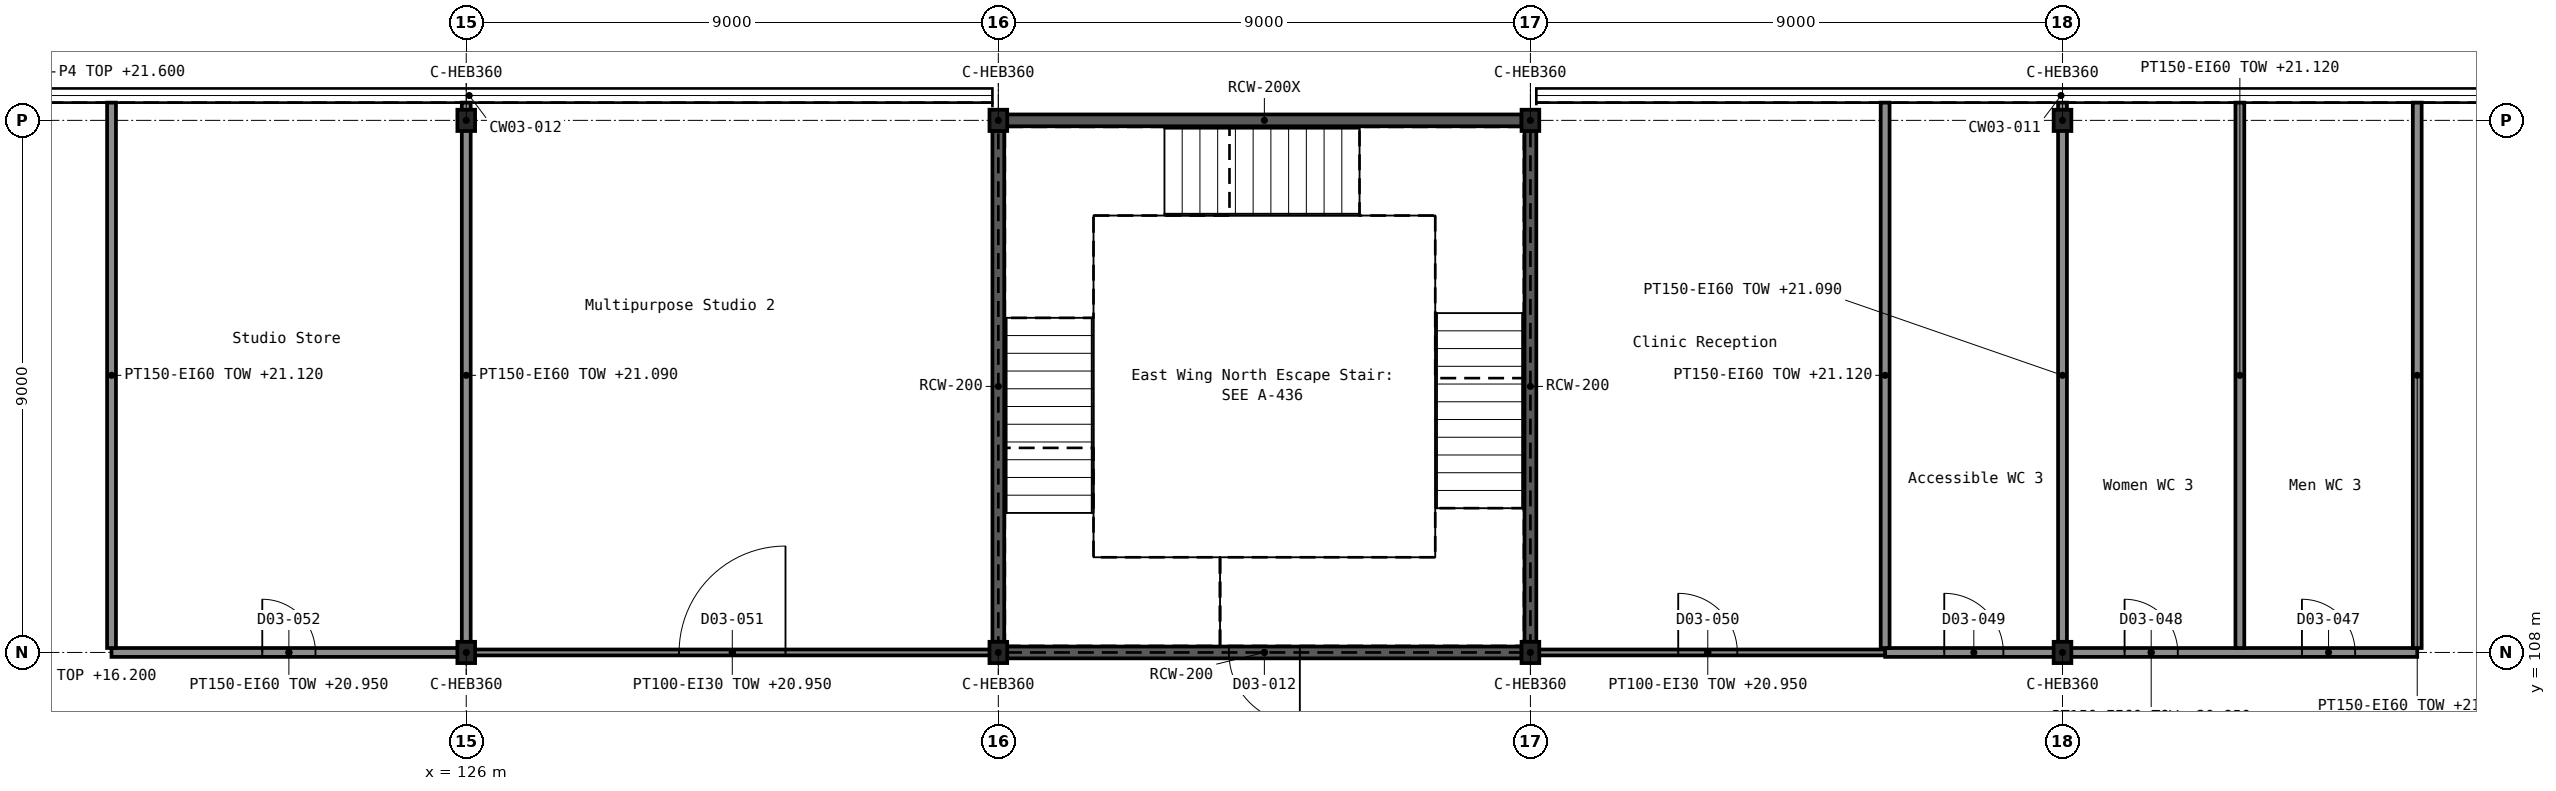
"""IFC4 building model, lengths in metres.
Left out: names, types, materials, properties, quantities, classifications, styles, units other than length and angle.
Written with IfcOpenShell. Run it as: python <this file> out.ifc"""

import sys

from ifc_helpers import new_model, si_unit, direction, frame, frame_2d, origin, origin_2d, place, context, subcontext, project, spatial, rectangle, i_section, extrude, element, fill, save


model = new_model("IFC4")
c1 = context("Model", 3, precision=1e-05, world=origin(), true_north=direction((0.0, 1.0)))
c2 = subcontext(c1, "Body", "Model", "MODEL_VIEW")
j1 = project(units=[si_unit("LENGTHUNIT", "METRE"), si_unit("PLANEANGLEUNIT", "RADIAN")], contexts=[c1])
p1 = place(None, origin())
s1 = spatial("IfcSite", under=j1, at=p1, CompositionType="ELEMENT")
p2 = place(p1, origin())
s2 = spatial("IfcBuilding", under=s1, at=p2, CompositionType="ELEMENT")
p3 = place(p2, frame((0.0, 0.0, 16.2)))
s3 = spatial("IfcBuildingStorey", under=s2, at=p3, CompositionType="ELEMENT", Elevation=16.2)
for number, where, z_axis, x_axis in (
    (1, (126.0, 108.0, 0.0), (0.0, 0.0, 1.0), (1.0, 0.0, 0.0)),
    (2, (135.0, 108.0, 0.0), (0.0, 0.0, 1.0), (1.0, 0.0, 0.0)),
    (3, (144.0, 108.0, 0.0), (0.0, 0.0, 1.0), (1.0, 0.0, 0.0)),
    (4, (153.0, 108.0, 0.0), (0.0, 0.0, 1.0), (1.0, 0.0, 0.0)),
    (5, (126.0, 117.0, 0.0), (0.0, 0.0, 1.0), (1.0, 0.0, 0.0)),
    (6, (135.0, 117.0, 0.0), (0.0, 0.0, 1.0), (1.0, 0.0, 0.0)),
    (7, (144.0, 117.0, 0.0), (0.0, 0.0, 1.0), (1.0, 0.0, 0.0)),
    (8, (153.0, 117.0, 0.0), (0.0, 0.0, 1.0), (1.0, 0.0, 0.0)),
):
    element("IfcColumn", number, at=place(p3, frame(where, z_axis=z_axis, x_axis=x_axis)), inside=s3, PredefinedType="COLUMN", context=c2, shape_type="SweptSolid", body=[
        extrude(i_section(OverallWidth=0.3, OverallDepth=0.36, WebThickness=0.012, FlangeThickness=0.022, FilletRadius=0.027, at=origin_2d()), origin(), (0.0, 0.0, 1.0), 5.4),
    ])
p4 = place(p3, frame((135.15, 108.0, 0.0), z_axis=(0.0, 0.0, 1.0), x_axis=(1.0, 0.0, 0.0)))
e9 = element("IfcWall", 9, at=p4, inside=s3, PredefinedType="SHEAR", context=c2, shape_type="SweptSolid", body=[
    extrude(rectangle(XDim=8.7, YDim=0.2, at=frame_2d((4.35, 0.0))), origin(), (0.0, 0.0, 1.0), 5.4),
])
p5 = place(p4, frame((3.75, 0.0, 0.0)))
e10 = element("IfcOpeningElement", 10, at=p5, cuts=e9, PredefinedType="OPENING", context=c2, shape_type="SweptSolid", body=[
    extrude(rectangle(XDim=1.2, YDim=2.1, at=frame_2d((0.6, 1.05))), frame((0.0, 0.111, 0.0), z_axis=(0.0, -1.0, 0.0), x_axis=(1.0, 0.0, 0.0)), (0.0, 0.0, 1.0), 0.222),
])
p6 = place(p3, frame((135.15, 117.0, 0.0), z_axis=(0.0, 0.0, 1.0), x_axis=(1.0, 0.0, 0.0)))
e11 = element("IfcWall", 11, at=p6, inside=s3, PredefinedType="SHEAR", context=c2, shape_type="SweptSolid", body=[
    extrude(rectangle(XDim=8.7, YDim=0.2, at=frame_2d((4.35, 0.0))), origin(), (0.0, 0.0, 1.0), 5.4),
])
for number, where, z_axis, x_axis in (
    (12, (135.0, 108.18, 0.0), (0.0, 0.0, 1.0), (0.0, 1.0, 0.0)),
    (13, (144.0, 108.18, 0.0), (0.0, 0.0, 1.0), (0.0, 1.0, 0.0)),
):
    element("IfcWall", number, at=place(p3, frame(where, z_axis=z_axis, x_axis=x_axis)), inside=s3, PredefinedType="SHEAR", context=c2, shape_type="SweptSolid", body=[
        extrude(rectangle(XDim=8.64, YDim=0.2, at=frame_2d((4.32, 0.0))), origin(), (0.0, 0.0, 1.0), 5.4),
    ])
p7 = place(p3, frame((120.0, 108.0, 0.0), z_axis=(0.0, 0.0, 1.0), x_axis=(1.0, 0.0, 0.0)))
e14 = element("IfcWall", 14, at=p7, inside=s3, PredefinedType="PARTITIONING", context=c2, shape_type="SweptSolid", body=[
    extrude(rectangle(XDim=6.0, YDim=0.15, at=frame_2d((3.0, 0.0))), origin(), (0.0, 0.0, 1.0), 4.75),
])
p8 = place(p7, frame((2.55, 0.0, 0.0)))
e15 = element("IfcOpeningElement", 15, at=p8, cuts=e14, PredefinedType="OPENING", context=c2, shape_type="SweptSolid", body=[
    extrude(rectangle(XDim=0.9, YDim=2.4, at=frame_2d((0.45, 1.2))), frame((0.0, 0.086, 0.0), z_axis=(0.0, -1.0, 0.0), x_axis=(1.0, 0.0, 0.0)), (0.0, 0.0, 1.0), 0.172),
])
p9 = place(p3, frame((150.0, 108.0, 0.0), z_axis=(0.0, 0.0, 1.0), x_axis=(1.0, 0.0, 0.0)))
e16 = element("IfcWall", 16, at=p9, inside=s3, PredefinedType="PARTITIONING", context=c2, shape_type="SweptSolid", body=[
    extrude(rectangle(XDim=9.0, YDim=0.15, at=frame_2d((4.5, 0.0))), origin(), (0.0, 0.0, 1.0), 4.75),
])
p10 = place(p9, frame((7.05, 0.0, 0.0)))
e17 = element("IfcOpeningElement", 17, at=p10, cuts=e16, PredefinedType="OPENING", context=c2, shape_type="SweptSolid", body=[
    extrude(rectangle(XDim=0.9, YDim=2.1, at=frame_2d((0.45, 1.05))), frame((0.0, 0.086, 0.0), z_axis=(0.0, -1.0, 0.0), x_axis=(1.0, 0.0, 0.0)), (0.0, 0.0, 1.0), 0.172),
])
p11 = place(p9, frame((4.05, 0.0, 0.0)))
e18 = element("IfcOpeningElement", 18, at=p11, cuts=e16, PredefinedType="OPENING", context=c2, shape_type="SweptSolid", body=[
    extrude(rectangle(XDim=0.9, YDim=2.1, at=frame_2d((0.45, 1.05))), frame((0.0, 0.086, 0.0), z_axis=(0.0, -1.0, 0.0), x_axis=(1.0, 0.0, 0.0)), (0.0, 0.0, 1.0), 0.172),
])
p12 = place(p9, frame((1.0, 0.0, 0.0)))
e19 = element("IfcOpeningElement", 19, at=p12, cuts=e16, PredefinedType="OPENING", context=c2, shape_type="SweptSolid", body=[
    extrude(rectangle(XDim=1.0, YDim=2.1, at=frame_2d((0.5, 1.05))), frame((0.0, 0.086, 0.0), z_axis=(0.0, -1.0, 0.0), x_axis=(1.0, 0.0, 0.0)), (0.0, 0.0, 1.0), 0.172),
])
p13 = place(p3, frame((120.0, 108.075, 0.0), z_axis=(0.0, 0.0, 1.0), x_axis=(0.0, 1.0, 0.0)))
e20 = element("IfcWall", 20, at=p13, inside=s3, PredefinedType="PARTITIONING", context=c2, shape_type="SweptSolid", body=[
    extrude(rectangle(XDim=9.225, YDim=0.15, at=frame_2d((4.613, 0.0))), origin(), (0.0, 0.0, 1.0), 4.92),
])
p14 = place(p3, frame((126.0, 108.075, 0.0), z_axis=(0.0, 0.0, 1.0), x_axis=(0.0, 1.0, 0.0)))
e21 = element("IfcWall", 21, at=p14, inside=s3, PredefinedType="PARTITIONING", context=c2, shape_type="SweptSolid", body=[
    extrude(rectangle(XDim=9.225, YDim=0.15, at=frame_2d((4.613, 0.0))), origin(), (0.0, 0.0, 1.0), 4.89),
])
p15 = place(p3, frame((150.0, 108.075, 0.0), z_axis=(0.0, 0.0, 1.0), x_axis=(0.0, 1.0, 0.0)))
e22 = element("IfcWall", 22, at=p15, inside=s3, PredefinedType="PARTITIONING", context=c2, shape_type="SweptSolid", body=[
    extrude(rectangle(XDim=9.225, YDim=0.15, at=frame_2d((4.613, 0.0))), origin(), (0.0, 0.0, 1.0), 4.92),
])
p16 = place(p3, frame((153.0, 108.075, 0.0), z_axis=(0.0, 0.0, 1.0), x_axis=(0.0, 1.0, 0.0)))
e23 = element("IfcWall", 23, at=p16, inside=s3, PredefinedType="PARTITIONING", context=c2, shape_type="SweptSolid", body=[
    extrude(rectangle(XDim=9.225, YDim=0.15, at=frame_2d((4.613, 0.0))), origin(), (0.0, 0.0, 1.0), 4.89),
])
for number, where, z_axis, x_axis in (
    (24, (156.0, 108.075, 0.0), (0.0, 0.0, 1.0), (0.0, 1.0, 0.0)),
    (25, (159.0, 108.075, 0.0), (0.0, 0.0, 1.0), (0.0, 1.0, 0.0)),
):
    element("IfcWall", number, at=place(p3, frame(where, z_axis=z_axis, x_axis=x_axis)), inside=s3, PredefinedType="PARTITIONING", context=c2, shape_type="SweptSolid", body=[
        extrude(rectangle(XDim=9.225, YDim=0.15, at=frame_2d((4.613, 0.0))), origin(), (0.0, 0.0, 1.0), 4.92),
    ])
p17 = place(p3, frame((126.0, 108.0, 0.0), z_axis=(0.0, 0.0, 1.0), x_axis=(1.0, 0.0, 0.0)))
e26 = element("IfcWall", 26, at=p17, inside=s3, PredefinedType="PARTITIONING", context=c2, shape_type="SweptSolid", body=[
    extrude(rectangle(XDim=9.0, YDim=0.1, at=frame_2d((4.5, 0.0))), origin(), (0.0, 0.0, 1.0), 4.75),
])
p18 = place(p17, frame((3.6, 0.0, 0.0)))
e27 = element("IfcOpeningElement", 27, at=p18, cuts=e26, PredefinedType="OPENING", context=c2, shape_type="SweptSolid", body=[
    extrude(rectangle(XDim=1.8, YDim=2.1, at=frame_2d((0.9, 1.05))), frame((0.0, 0.061, 0.0), z_axis=(0.0, -1.0, 0.0), x_axis=(1.0, 0.0, 0.0)), (0.0, 0.0, 1.0), 0.122),
])
p19 = place(p3, frame((144.0, 108.0, 0.0), z_axis=(0.0, 0.0, 1.0), x_axis=(1.0, 0.0, 0.0)))
e28 = element("IfcWall", 28, at=p19, inside=s3, PredefinedType="PARTITIONING", context=c2, shape_type="SweptSolid", body=[
    extrude(rectangle(XDim=6.0, YDim=0.1, at=frame_2d((3.0, 0.0))), origin(), (0.0, 0.0, 1.0), 4.75),
])
p20 = place(p19, frame((2.5, 0.0, 0.0)))
e29 = element("IfcOpeningElement", 29, at=p20, cuts=e28, PredefinedType="OPENING", context=c2, shape_type="SweptSolid", body=[
    extrude(rectangle(XDim=1.0, YDim=2.4, at=frame_2d((0.5, 1.2))), frame((0.0, 0.061, 0.0), z_axis=(0.0, -1.0, 0.0), x_axis=(1.0, 0.0, 0.0)), (0.0, 0.0, 1.0), 0.122),
])
p21 = place(p5, frame((1.2, 0.0, 0.0), z_axis=(0.0, 0.0, 1.0), x_axis=(-1.0, 0.0, 0.0)))
e30 = element("IfcDoor", 30, at=p21, inside=s3, OperationType="SINGLE_SWING_LEFT", PredefinedType="DOOR", context=c2, shape_type="SweptSolid", body=[
    extrude(rectangle(XDim=1.2, YDim=2.1, at=frame_2d((0.6, 1.05))), frame((0.0, 0.025, 0.0), z_axis=(0.0, -1.0, 0.0), x_axis=(1.0, 0.0, 0.0)), (0.0, 0.0, 1.0), 0.05),
])
fill(e10, e30)
p22 = place(p10, origin())
e31 = element("IfcDoor", 31, at=p22, inside=s3, OperationType="SINGLE_SWING_LEFT", PredefinedType="DOOR", context=c2, shape_type="SweptSolid", body=[
    extrude(rectangle(XDim=0.9, YDim=2.1, at=frame_2d((0.45, 1.05))), frame((0.0, 0.025, 0.0), z_axis=(0.0, -1.0, 0.0), x_axis=(1.0, 0.0, 0.0)), (0.0, 0.0, 1.0), 0.05),
])
fill(e17, e31)
p23 = place(p11, origin())
e32 = element("IfcDoor", 32, at=p23, inside=s3, OperationType="SINGLE_SWING_LEFT", PredefinedType="DOOR", context=c2, shape_type="SweptSolid", body=[
    extrude(rectangle(XDim=0.9, YDim=2.1, at=frame_2d((0.45, 1.05))), frame((0.0, 0.025, 0.0), z_axis=(0.0, -1.0, 0.0), x_axis=(1.0, 0.0, 0.0)), (0.0, 0.0, 1.0), 0.05),
])
fill(e18, e32)
p24 = place(p12, origin())
e33 = element("IfcDoor", 33, at=p24, inside=s3, OperationType="SINGLE_SWING_LEFT", PredefinedType="DOOR", context=c2, shape_type="SweptSolid", body=[
    extrude(rectangle(XDim=1.0, YDim=2.1, at=frame_2d((0.5, 1.05))), frame((0.0, 0.025, 0.0), z_axis=(0.0, -1.0, 0.0), x_axis=(1.0, 0.0, 0.0)), (0.0, 0.0, 1.0), 0.05),
])
fill(e19, e33)
p25 = place(p20, origin())
e34 = element("IfcDoor", 34, at=p25, inside=s3, OperationType="SINGLE_SWING_LEFT", PredefinedType="DOOR", context=c2, shape_type="SweptSolid", body=[
    extrude(rectangle(XDim=1.0, YDim=2.4, at=frame_2d((0.5, 1.2))), frame((0.0, 0.025, 0.0), z_axis=(0.0, -1.0, 0.0), x_axis=(1.0, 0.0, 0.0)), (0.0, 0.0, 1.0), 0.05),
])
fill(e29, e34)
p26 = place(p18, origin())
e35 = element("IfcDoor", 35, at=p26, inside=s3, OperationType="DOUBLE_DOOR_SINGLE_SWING", PredefinedType="DOOR", context=c2, shape_type="SweptSolid", body=[
    extrude(rectangle(XDim=1.8, YDim=2.1, at=frame_2d((0.9, 1.05))), frame((0.0, 0.025, 0.0), z_axis=(0.0, -1.0, 0.0), x_axis=(1.0, 0.0, 0.0)), (0.0, 0.0, 1.0), 0.05),
])
fill(e27, e35)
p27 = place(p8, origin())
e36 = element("IfcDoor", 36, at=p27, inside=s3, OperationType="SINGLE_SWING_LEFT", PredefinedType="DOOR", context=c2, shape_type="SweptSolid", body=[
    extrude(rectangle(XDim=0.9, YDim=2.4, at=frame_2d((0.45, 1.2))), frame((0.0, 0.025, 0.0), z_axis=(0.0, -1.0, 0.0), x_axis=(1.0, 0.0, 0.0)), (0.0, 0.0, 1.0), 0.05),
])
fill(e15, e36)
save(model, sys.argv[1])
